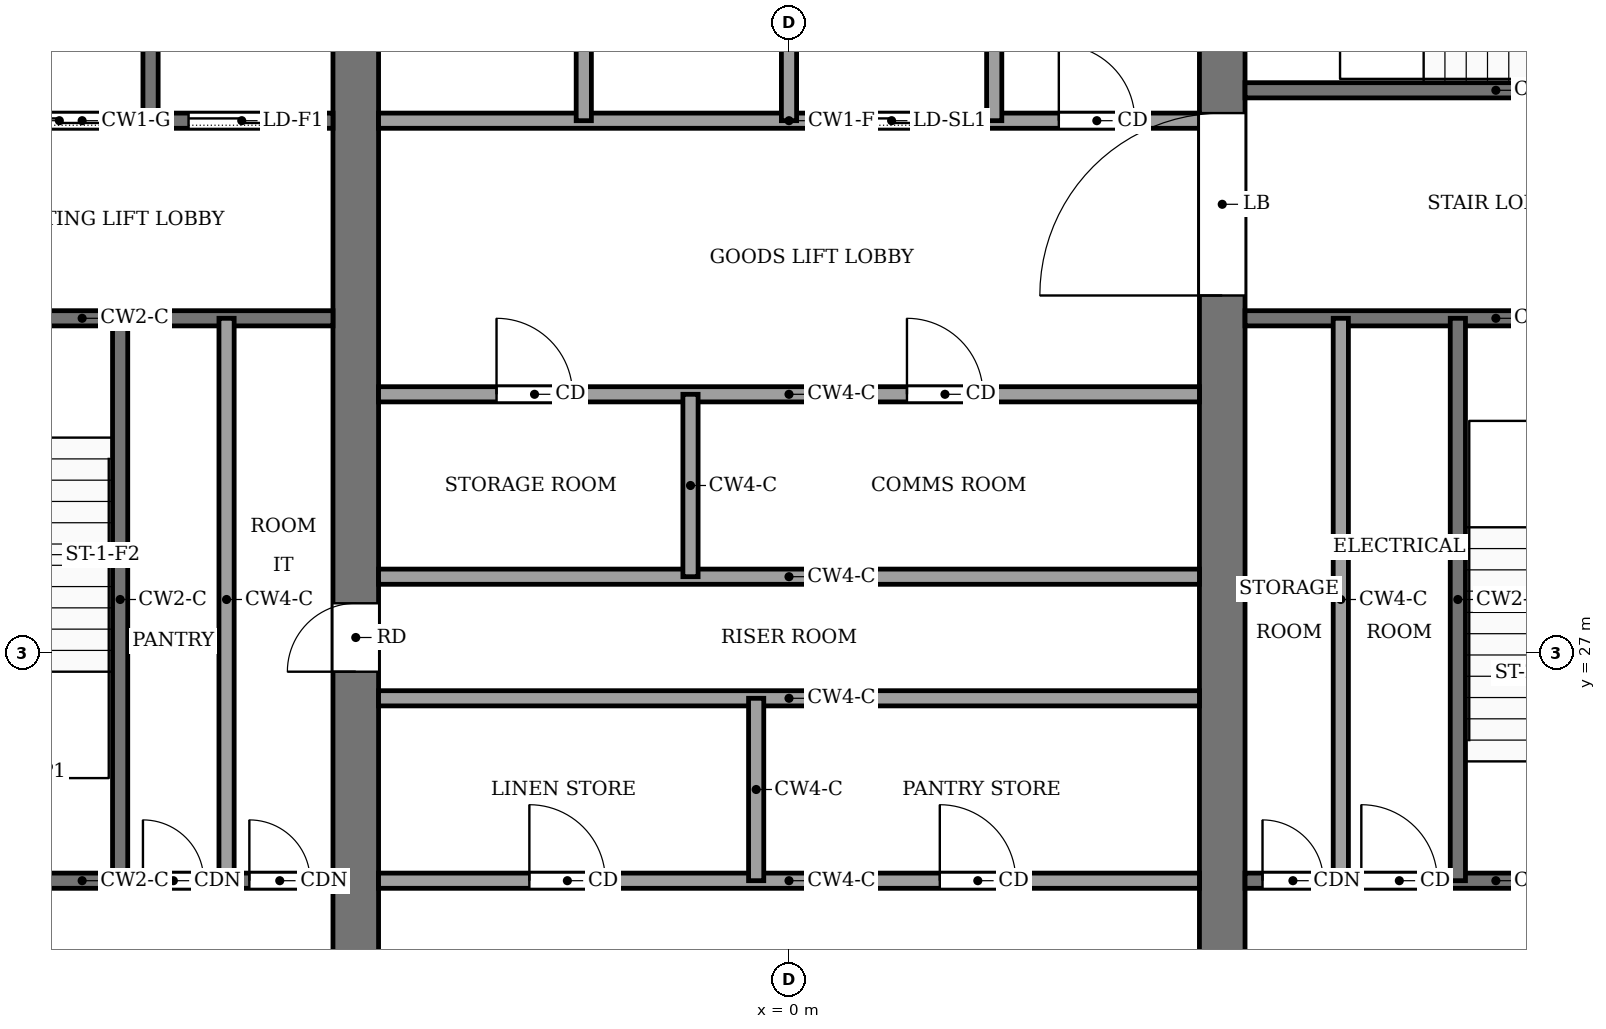
"""IFC4 building model, lengths in metres.
Left out: names, types, materials, properties, quantities, classifications, styles, units other than length and angle.
Written with IfcOpenShell. Run it as: python <this file> out.ifc"""

import sys

from ifc_helpers import new_model, si_unit, direction, frame, frame_2d, origin, place, context, subcontext, project, spatial, rectangle, extrude, element, fill, save


model = new_model("IFC4")
c1 = context("Model", 3, precision=1e-05, world=origin(), true_north=direction((0.0, 1.0)))
c2 = subcontext(c1, "Body", "Model", "MODEL_VIEW")
j1 = project(units=[si_unit("LENGTHUNIT", "METRE"), si_unit("PLANEANGLEUNIT", "RADIAN")], contexts=[c1])
p1 = place(None, origin())
s1 = spatial("IfcSite", under=j1, at=p1, CompositionType="ELEMENT")
p2 = place(p1, origin())
s2 = spatial("IfcBuilding", under=s1, at=p2, CompositionType="ELEMENT")
p3 = place(p2, frame((0.0, 0.0, 322.0)))
s3 = spatial("IfcBuildingStorey", under=s2, at=p3, CompositionType="ELEMENT", Elevation=322.0)
p4 = place(p3, frame((-5.7, 18.4, -0.13), z_axis=(0.0, 0.0, 1.0), x_axis=(0.0, 1.0, 0.0)))
e1 = element("IfcWall", 1, at=p4, inside=s3, PredefinedType="SHEAR", context=c2, shape_type="SweptSolid", body=[
    extrude(rectangle(XDim=19.2, YDim=0.6, at=frame_2d((9.6, 0.0))), origin(), (0.0, 0.0, 1.0), 4.0),
])
p5 = place(p4, frame((8.35, 0.0, 0.13)))
e2 = element("IfcOpeningElement", 2, at=p5, cuts=e1, PredefinedType="OPENING", context=c2, shape_type="SweptSolid", body=[
    extrude(rectangle(XDim=0.9, YDim=2.1, at=frame_2d((0.45, 1.05))), frame((0.0, 0.31, 0.0), z_axis=(0.0, -1.0, 0.0), x_axis=(1.0, 0.0, 0.0)), (0.0, 0.0, 1.0), 0.62),
])
p6 = place(p3, frame((5.7, 18.4, -0.13), z_axis=(0.0, 0.0, 1.0), x_axis=(0.0, 1.0, 0.0)))
e3 = element("IfcWall", 3, at=p6, inside=s3, PredefinedType="SHEAR", context=c2, shape_type="SweptSolid", body=[
    extrude(rectangle(XDim=19.2, YDim=0.6, at=frame_2d((9.6, 0.0))), origin(), (0.0, 0.0, 1.0), 4.0),
])
p7 = place(p6, frame((13.3, 0.0, 0.13)))
e4 = element("IfcOpeningElement", 4, at=p7, cuts=e3, PredefinedType="OPENING", context=c2, shape_type="SweptSolid", body=[
    extrude(rectangle(XDim=2.4, YDim=2.4, at=frame_2d((1.2, 1.2))), frame((0.0, 0.31, 0.0), z_axis=(0.0, -1.0, 0.0), x_axis=(1.0, 0.0, 0.0)), (0.0, 0.0, 1.0), 0.62),
])
p8 = place(p3, frame((-12.6, 24.0, 0.0), z_axis=(0.0, 0.0, 1.0), x_axis=(1.0, 0.0, 0.0)))
e5 = element("IfcWall", 5, at=p8, inside=s3, PredefinedType="PARTITIONING", context=c2, shape_type="SweptSolid", body=[
    extrude(rectangle(XDim=6.6, YDim=0.2, at=frame_2d((3.3, 0.0))), origin(), (0.0, 0.0, 1.0), 3.87),
])
p9 = place(p8, frame((4.1, 0.0, 0.0)))
e6 = element("IfcOpeningElement", 6, at=p9, cuts=e5, PredefinedType="OPENING", context=c2, shape_type="SweptSolid", body=[
    extrude(rectangle(XDim=0.8, YDim=2.1, at=frame_2d((0.4, 1.05))), frame((0.0, 0.11, 0.0), z_axis=(0.0, -1.0, 0.0), x_axis=(1.0, 0.0, 0.0)), (0.0, 0.0, 1.0), 0.22),
])
p10 = place(p8, frame((5.5, 0.0, 0.0)))
e7 = element("IfcOpeningElement", 7, at=p10, cuts=e5, PredefinedType="OPENING", context=c2, shape_type="SweptSolid", body=[
    extrude(rectangle(XDim=0.8, YDim=2.1, at=frame_2d((0.4, 1.05))), frame((0.0, 0.11, 0.0), z_axis=(0.0, -1.0, 0.0), x_axis=(1.0, 0.0, 0.0)), (0.0, 0.0, 1.0), 0.22),
])
p11 = place(p3, frame((-5.4, 24.0, 0.0), z_axis=(0.0, 0.0, 1.0), x_axis=(1.0, 0.0, 0.0)))
e8 = element("IfcWall", 8, at=p11, inside=s3, PredefinedType="PARTITIONING", context=c2, shape_type="SweptSolid", body=[
    extrude(rectangle(XDim=10.8, YDim=0.2, at=frame_2d((5.4, 0.0))), origin(), (0.0, 0.0, 1.0), 3.87),
])
p12 = place(p11, frame((1.984, 0.0, 0.0)))
e9 = element("IfcOpeningElement", 9, at=p12, cuts=e8, PredefinedType="OPENING", context=c2, shape_type="SweptSolid", body=[
    extrude(rectangle(XDim=1.0, YDim=2.1, at=frame_2d((0.5, 1.05))), frame((0.0, 0.11, 0.0), z_axis=(0.0, -1.0, 0.0), x_axis=(1.0, 0.0, 0.0)), (0.0, 0.0, 1.0), 0.22),
])
p13 = place(p11, frame((7.384, 0.0, 0.0)))
e10 = element("IfcOpeningElement", 10, at=p13, cuts=e8, PredefinedType="OPENING", context=c2, shape_type="SweptSolid", body=[
    extrude(rectangle(XDim=1.0, YDim=2.1, at=frame_2d((0.5, 1.05))), frame((0.0, 0.11, 0.0), z_axis=(0.0, -1.0, 0.0), x_axis=(1.0, 0.0, 0.0)), (0.0, 0.0, 1.0), 0.22),
])
p14 = place(p3, frame((6.0, 24.0, 0.0), z_axis=(0.0, 0.0, 1.0), x_axis=(1.0, 0.0, 0.0)))
e11 = element("IfcWall", 11, at=p14, inside=s3, PredefinedType="PARTITIONING", context=c2, shape_type="SweptSolid", body=[
    extrude(rectangle(XDim=6.6, YDim=0.2, at=frame_2d((3.3, 0.0))), origin(), (0.0, 0.0, 1.0), 3.87),
])
p15 = place(p14, frame((0.23, 0.0, 0.0)))
e12 = element("IfcOpeningElement", 12, at=p15, cuts=e11, PredefinedType="OPENING", context=c2, shape_type="SweptSolid", body=[
    extrude(rectangle(XDim=0.8, YDim=2.1, at=frame_2d((0.4, 1.05))), frame((0.0, 0.11, 0.0), z_axis=(0.0, -1.0, 0.0), x_axis=(1.0, 0.0, 0.0)), (0.0, 0.0, 1.0), 0.22),
])
p16 = place(p14, frame((1.53, 0.0, 0.0)))
e13 = element("IfcOpeningElement", 13, at=p16, cuts=e11, PredefinedType="OPENING", context=c2, shape_type="SweptSolid", body=[
    extrude(rectangle(XDim=1.0, YDim=2.1, at=frame_2d((0.5, 1.05))), frame((0.0, 0.11, 0.0), z_axis=(0.0, -1.0, 0.0), x_axis=(1.0, 0.0, 0.0)), (0.0, 0.0, 1.0), 0.22),
])
p17 = place(p14, frame((4.4, 0.0, 0.0)))
e14 = element("IfcOpeningElement", 14, at=p17, cuts=e11, PredefinedType="OPENING", context=c2, shape_type="SweptSolid", body=[
    extrude(rectangle(XDim=1.2, YDim=2.2, at=frame_2d((0.6, 1.1))), frame((0.0, 0.11, 0.0), z_axis=(0.0, -1.0, 0.0), x_axis=(1.0, 0.0, 0.0)), (0.0, 0.0, 1.0), 0.22),
])
for number, where, z_axis, x_axis in (
    (15, (-5.4, 26.4, 0.0), (0.0, 0.0, 1.0), (1.0, 0.0, 0.0)),
    (16, (-5.4, 28.0, 0.0), (0.0, 0.0, 1.0), (1.0, 0.0, 0.0)),
):
    element("IfcWall", number, at=place(p3, frame(where, z_axis=z_axis, x_axis=x_axis)), inside=s3, PredefinedType="PARTITIONING", context=c2, shape_type="SweptSolid", body=[
        extrude(rectangle(XDim=10.8, YDim=0.2, at=frame_2d((5.4, 0.0))), origin(), (0.0, 0.0, 1.0), 3.87),
    ])
p18 = place(p3, frame((-5.4, 30.4, 0.0), z_axis=(0.0, 0.0, 1.0), x_axis=(1.0, 0.0, 0.0)))
e17 = element("IfcWall", 17, at=p18, inside=s3, PredefinedType="PARTITIONING", context=c2, shape_type="SweptSolid", body=[
    extrude(rectangle(XDim=10.8, YDim=0.2, at=frame_2d((5.4, 0.0))), origin(), (0.0, 0.0, 1.0), 3.87),
])
p19 = place(p18, frame((1.552, 0.0, 0.0)))
e18 = element("IfcOpeningElement", 18, at=p19, cuts=e17, PredefinedType="OPENING", context=c2, shape_type="SweptSolid", body=[
    extrude(rectangle(XDim=1.0, YDim=2.1, at=frame_2d((0.5, 1.05))), frame((0.0, 0.11, 0.0), z_axis=(0.0, -1.0, 0.0), x_axis=(1.0, 0.0, 0.0)), (0.0, 0.0, 1.0), 0.22),
])
p20 = place(p18, frame((6.952, 0.0, 0.0)))
e19 = element("IfcOpeningElement", 19, at=p20, cuts=e17, PredefinedType="OPENING", context=c2, shape_type="SweptSolid", body=[
    extrude(rectangle(XDim=1.0, YDim=2.1, at=frame_2d((0.5, 1.05))), frame((0.0, 0.11, 0.0), z_axis=(0.0, -1.0, 0.0), x_axis=(1.0, 0.0, 0.0)), (0.0, 0.0, 1.0), 0.22),
])
p21 = place(p3, frame((-12.6, 31.4, 0.0), z_axis=(0.0, 0.0, 1.0), x_axis=(1.0, 0.0, 0.0)))
e20 = element("IfcWall", 20, at=p21, inside=s3, PredefinedType="PARTITIONING", context=c2, shape_type="SweptSolid", body=[
    extrude(rectangle(XDim=6.6, YDim=0.2, at=frame_2d((3.3, 0.0))), origin(), (0.0, 0.0, 1.0), 3.87),
])
p22 = place(p21, frame((1.0, 0.0, 0.0)))
e21 = element("IfcOpeningElement", 21, at=p22, cuts=e20, PredefinedType="OPENING", context=c2, shape_type="SweptSolid", body=[
    extrude(rectangle(XDim=1.2, YDim=2.2, at=frame_2d((0.6, 1.1))), frame((0.0, 0.11, 0.0), z_axis=(0.0, -1.0, 0.0), x_axis=(1.0, 0.0, 0.0)), (0.0, 0.0, 1.0), 0.22),
])
p23 = place(p3, frame((6.0, 31.4, 0.0), z_axis=(0.0, 0.0, 1.0), x_axis=(1.0, 0.0, 0.0)))
e22 = element("IfcWall", 22, at=p23, inside=s3, PredefinedType="PARTITIONING", context=c2, shape_type="SweptSolid", body=[
    extrude(rectangle(XDim=6.6, YDim=0.2, at=frame_2d((3.3, 0.0))), origin(), (0.0, 0.0, 1.0), 3.87),
])
p24 = place(p3, frame((-12.6, 34.0, 0.0), z_axis=(0.0, 0.0, 1.0), x_axis=(1.0, 0.0, 0.0)))
e23 = element("IfcWall", 23, at=p24, inside=s3, PredefinedType="PARTITIONING", context=c2, shape_type="SweptSolid", body=[
    extrude(rectangle(XDim=6.6, YDim=0.2, at=frame_2d((3.3, 0.0))), origin(), (0.0, 0.0, 1.0), 3.87),
])
p25 = place(p24, frame((4.7, 0.0, 0.0)))
e24 = element("IfcOpeningElement", 24, at=p25, cuts=e23, PredefinedType="OPENING", context=c2, shape_type="SweptSolid", body=[
    extrude(rectangle(XDim=1.4, YDim=2.2, at=frame_2d((0.7, 1.1))), frame((0.0, 0.11, 0.0), z_axis=(0.0, -1.0, 0.0), x_axis=(1.0, 0.0, 0.0)), (0.0, 0.0, 1.0), 0.22),
])
p26 = place(p24, frame((2.3, 0.0, 0.0)))
e25 = element("IfcOpeningElement", 25, at=p26, cuts=e23, PredefinedType="OPENING", context=c2, shape_type="SweptSolid", body=[
    extrude(rectangle(XDim=1.4, YDim=2.2, at=frame_2d((0.7, 1.1))), frame((0.0, 0.11, 0.0), z_axis=(0.0, -1.0, 0.0), x_axis=(1.0, 0.0, 0.0)), (0.0, 0.0, 1.0), 0.22),
])
p27 = place(p24, frame((0.45, 0.0, 0.0)))
e26 = element("IfcOpeningElement", 26, at=p27, cuts=e23, PredefinedType="OPENING", context=c2, shape_type="SweptSolid", body=[
    extrude(rectangle(XDim=0.9, YDim=2.1, at=frame_2d((0.45, 1.05))), frame((0.0, 0.11, 0.0), z_axis=(0.0, -1.0, 0.0), x_axis=(1.0, 0.0, 0.0)), (0.0, 0.0, 1.0), 0.22),
])
p28 = place(p3, frame((-5.4, 34.0, 0.0), z_axis=(0.0, 0.0, 1.0), x_axis=(1.0, 0.0, 0.0)))
e27 = element("IfcWall", 27, at=p28, inside=s3, PredefinedType="PARTITIONING", context=c2, shape_type="SweptSolid", body=[
    extrude(rectangle(XDim=10.8, YDim=0.2, at=frame_2d((5.4, 0.0))), origin(), (0.0, 0.0, 1.0), 3.87),
])
p29 = place(p28, frame((6.15, 0.0, 0.0)))
e28 = element("IfcOpeningElement", 28, at=p29, cuts=e27, PredefinedType="OPENING", context=c2, shape_type="SweptSolid", body=[
    extrude(rectangle(XDim=1.2, YDim=2.2, at=frame_2d((0.6, 1.1))), frame((0.0, 0.11, 0.0), z_axis=(0.0, -1.0, 0.0), x_axis=(1.0, 0.0, 0.0)), (0.0, 0.0, 1.0), 0.22),
])
p30 = place(p28, frame((8.95, 0.0, 0.0)))
e29 = element("IfcOpeningElement", 29, at=p30, cuts=e27, PredefinedType="OPENING", context=c2, shape_type="SweptSolid", body=[
    extrude(rectangle(XDim=1.0, YDim=2.1, at=frame_2d((0.5, 1.05))), frame((0.0, 0.11, 0.0), z_axis=(0.0, -1.0, 0.0), x_axis=(1.0, 0.0, 0.0)), (0.0, 0.0, 1.0), 0.22),
])
p31 = place(p3, frame((6.0, 34.4, 0.0), z_axis=(0.0, 0.0, 1.0), x_axis=(1.0, 0.0, 0.0)))
e30 = element("IfcWall", 30, at=p31, inside=s3, PredefinedType="PARTITIONING", context=c2, shape_type="SweptSolid", body=[
    extrude(rectangle(XDim=6.6, YDim=0.2, at=frame_2d((3.3, 0.0))), origin(), (0.0, 0.0, 1.0), 3.87),
])
p32 = place(p31, frame((4.8, 0.0, 0.0)))
e31 = element("IfcOpeningElement", 31, at=p32, cuts=e30, PredefinedType="OPENING", context=c2, shape_type="SweptSolid", body=[
    extrude(rectangle(XDim=1.2, YDim=2.2, at=frame_2d((0.6, 1.1))), frame((0.0, 0.11, 0.0), z_axis=(0.0, -1.0, 0.0), x_axis=(1.0, 0.0, 0.0)), (0.0, 0.0, 1.0), 0.22),
])
p33 = place(p3, frame((-8.8, 24.0, 0.0), z_axis=(0.0, 0.0, 1.0), x_axis=(0.0, 1.0, 0.0)))
e32 = element("IfcWall", 32, at=p33, inside=s3, PredefinedType="PARTITIONING", context=c2, shape_type="SweptSolid", body=[
    extrude(rectangle(XDim=7.4, YDim=0.2, at=frame_2d((3.7, 0.0))), origin(), (0.0, 0.0, 1.0), 3.87),
])
p34 = place(p3, frame((-8.4, 34.0, 0.0), z_axis=(0.0, 0.0, 1.0), x_axis=(0.0, 1.0, 0.0)))
e33 = element("IfcWall", 33, at=p34, inside=s3, PredefinedType="PARTITIONING", context=c2, shape_type="SweptSolid", body=[
    extrude(rectangle(XDim=3.6, YDim=0.2, at=frame_2d((1.8, 0.0))), origin(), (0.0, 0.0, 1.0), 3.87),
])
p35 = place(p3, frame((-7.4, 24.0, 0.0), z_axis=(0.0, 0.0, 1.0), x_axis=(0.0, 1.0, 0.0)))
e34 = element("IfcWall", 34, at=p35, inside=s3, PredefinedType="PARTITIONING", context=c2, shape_type="SweptSolid", body=[
    extrude(rectangle(XDim=7.4, YDim=0.2, at=frame_2d((3.7, 0.0))), origin(), (0.0, 0.0, 1.0), 3.87),
])
p36 = place(p3, frame((-2.7, 34.0, 0.0), z_axis=(0.0, 0.0, 1.0), x_axis=(0.0, 1.0, 0.0)))
e35 = element("IfcWall", 35, at=p36, inside=s3, PredefinedType="PARTITIONING", context=c2, shape_type="SweptSolid", body=[
    extrude(rectangle(XDim=3.6, YDim=0.2, at=frame_2d((1.8, 0.0))), origin(), (0.0, 0.0, 1.0), 3.87),
])
for number, where, z_axis, x_axis in (
    (36, (-1.296, 28.0, 0.0), (0.0, 0.0, 1.0), (0.0, 1.0, 0.0)),
    (37, (-0.432, 24.0, 0.0), (0.0, 0.0, 1.0), (0.0, 1.0, 0.0)),
):
    element("IfcWall", number, at=place(p3, frame(where, z_axis=z_axis, x_axis=x_axis)), inside=s3, PredefinedType="PARTITIONING", context=c2, shape_type="SweptSolid", body=[
        extrude(rectangle(XDim=2.4, YDim=0.2, at=frame_2d((1.2, 0.0))), origin(), (0.0, 0.0, 1.0), 3.87),
    ])
for number, where, z_axis, x_axis in (
    (38, (0.0, 34.0, 0.0), (0.0, 0.0, 1.0), (0.0, 1.0, 0.0)),
    (39, (2.7, 34.0, 0.0), (0.0, 0.0, 1.0), (0.0, 1.0, 0.0)),
):
    element("IfcWall", number, at=place(p3, frame(where, z_axis=z_axis, x_axis=x_axis)), inside=s3, PredefinedType="PARTITIONING", context=c2, shape_type="SweptSolid", body=[
        extrude(rectangle(XDim=3.6, YDim=0.2, at=frame_2d((1.8, 0.0))), origin(), (0.0, 0.0, 1.0), 3.87),
    ])
for number, where, z_axis, x_axis in (
    (40, (7.26, 24.0, 0.0), (0.0, 0.0, 1.0), (0.0, 1.0, 0.0)),
    (41, (8.8, 24.0, 0.0), (0.0, 0.0, 1.0), (0.0, 1.0, 0.0)),
):
    element("IfcWall", number, at=place(p3, frame(where, z_axis=z_axis, x_axis=x_axis)), inside=s3, PredefinedType="PARTITIONING", context=c2, shape_type="SweptSolid", body=[
        extrude(rectangle(XDim=7.4, YDim=0.2, at=frame_2d((3.7, 0.0))), origin(), (0.0, 0.0, 1.0), 3.87),
    ])
p37 = place(p29, origin())
e42 = element("IfcDoor", 42, at=p37, inside=s3, OperationType="SLIDING_TO_LEFT", PredefinedType="DOOR", context=c2, shape_type="SweptSolid", body=[
    extrude(rectangle(XDim=1.2, YDim=2.2, at=frame_2d((0.6, 1.1))), frame((0.0, 0.025, 0.0), z_axis=(0.0, -1.0, 0.0), x_axis=(1.0, 0.0, 0.0)), (0.0, 0.0, 1.0), 0.05),
])
fill(e28, e42)
p38 = place(p25, origin())
e43 = element("IfcDoor", 43, at=p38, inside=s3, OperationType="SLIDING_TO_LEFT", PredefinedType="DOOR", context=c2, shape_type="SweptSolid", body=[
    extrude(rectangle(XDim=1.4, YDim=2.2, at=frame_2d((0.7, 1.1))), frame((0.0, 0.025, 0.0), z_axis=(0.0, -1.0, 0.0), x_axis=(1.0, 0.0, 0.0)), (0.0, 0.0, 1.0), 0.05),
])
fill(e24, e43)
p39 = place(p26, origin())
e44 = element("IfcDoor", 44, at=p39, inside=s3, OperationType="SLIDING_TO_LEFT", PredefinedType="DOOR", context=c2, shape_type="SweptSolid", body=[
    extrude(rectangle(XDim=1.4, YDim=2.2, at=frame_2d((0.7, 1.1))), frame((0.0, 0.025, 0.0), z_axis=(0.0, -1.0, 0.0), x_axis=(1.0, 0.0, 0.0)), (0.0, 0.0, 1.0), 0.05),
])
fill(e25, e44)
p40 = place(p12, origin())
e45 = element("IfcDoor", 45, at=p40, inside=s3, OperationType="SINGLE_SWING_LEFT", PredefinedType="DOOR", context=c2, shape_type="SweptSolid", body=[
    extrude(rectangle(XDim=1.0, YDim=2.1, at=frame_2d((0.5, 1.05))), frame((0.0, 0.025, 0.0), z_axis=(0.0, -1.0, 0.0), x_axis=(1.0, 0.0, 0.0)), (0.0, 0.0, 1.0), 0.05),
])
fill(e9, e45)
p41 = place(p13, origin())
e46 = element("IfcDoor", 46, at=p41, inside=s3, OperationType="SINGLE_SWING_RIGHT", PredefinedType="DOOR", context=c2, shape_type="SweptSolid", body=[
    extrude(rectangle(XDim=1.0, YDim=2.1, at=frame_2d((0.5, 1.05))), frame((0.0, 0.025, 0.0), z_axis=(0.0, -1.0, 0.0), x_axis=(1.0, 0.0, 0.0)), (0.0, 0.0, 1.0), 0.05),
])
fill(e10, e46)
p42 = place(p19, origin())
e47 = element("IfcDoor", 47, at=p42, inside=s3, OperationType="SINGLE_SWING_LEFT", PredefinedType="DOOR", context=c2, shape_type="SweptSolid", body=[
    extrude(rectangle(XDim=1.0, YDim=2.1, at=frame_2d((0.5, 1.05))), frame((0.0, 0.025, 0.0), z_axis=(0.0, -1.0, 0.0), x_axis=(1.0, 0.0, 0.0)), (0.0, 0.0, 1.0), 0.05),
])
fill(e18, e47)
p43 = place(p20, origin())
e48 = element("IfcDoor", 48, at=p43, inside=s3, OperationType="SINGLE_SWING_RIGHT", PredefinedType="DOOR", context=c2, shape_type="SweptSolid", body=[
    extrude(rectangle(XDim=1.0, YDim=2.1, at=frame_2d((0.5, 1.05))), frame((0.0, 0.025, 0.0), z_axis=(0.0, -1.0, 0.0), x_axis=(1.0, 0.0, 0.0)), (0.0, 0.0, 1.0), 0.05),
])
fill(e19, e48)
p44 = place(p9, origin())
e49 = element("IfcDoor", 49, at=p44, inside=s3, OperationType="SINGLE_SWING_LEFT", PredefinedType="DOOR", context=c2, shape_type="SweptSolid", body=[
    extrude(rectangle(XDim=0.8, YDim=2.1, at=frame_2d((0.4, 1.05))), frame((0.0, 0.025, 0.0), z_axis=(0.0, -1.0, 0.0), x_axis=(1.0, 0.0, 0.0)), (0.0, 0.0, 1.0), 0.05),
])
fill(e6, e49)
p45 = place(p10, origin())
e50 = element("IfcDoor", 50, at=p45, inside=s3, OperationType="SINGLE_SWING_RIGHT", PredefinedType="DOOR", context=c2, shape_type="SweptSolid", body=[
    extrude(rectangle(XDim=0.8, YDim=2.1, at=frame_2d((0.4, 1.05))), frame((0.0, 0.025, 0.0), z_axis=(0.0, -1.0, 0.0), x_axis=(1.0, 0.0, 0.0)), (0.0, 0.0, 1.0), 0.05),
])
fill(e7, e50)
p46 = place(p15, origin())
e51 = element("IfcDoor", 51, at=p46, inside=s3, OperationType="SINGLE_SWING_RIGHT", PredefinedType="DOOR", context=c2, shape_type="SweptSolid", body=[
    extrude(rectangle(XDim=0.8, YDim=2.1, at=frame_2d((0.4, 1.05))), frame((0.0, 0.025, 0.0), z_axis=(0.0, -1.0, 0.0), x_axis=(1.0, 0.0, 0.0)), (0.0, 0.0, 1.0), 0.05),
])
fill(e12, e51)
p47 = place(p16, origin())
e52 = element("IfcDoor", 52, at=p47, inside=s3, OperationType="SINGLE_SWING_LEFT", PredefinedType="DOOR", context=c2, shape_type="SweptSolid", body=[
    extrude(rectangle(XDim=1.0, YDim=2.1, at=frame_2d((0.5, 1.05))), frame((0.0, 0.025, 0.0), z_axis=(0.0, -1.0, 0.0), x_axis=(1.0, 0.0, 0.0)), (0.0, 0.0, 1.0), 0.05),
])
fill(e13, e52)
p48 = place(p30, origin())
e53 = element("IfcDoor", 53, at=p48, inside=s3, OperationType="SINGLE_SWING_LEFT", PredefinedType="DOOR", context=c2, shape_type="SweptSolid", body=[
    extrude(rectangle(XDim=1.0, YDim=2.1, at=frame_2d((0.5, 1.05))), frame((0.0, 0.025, 0.0), z_axis=(0.0, -1.0, 0.0), x_axis=(1.0, 0.0, 0.0)), (0.0, 0.0, 1.0), 0.05),
])
fill(e29, e53)
p49 = place(p5, origin())
e54 = element("IfcDoor", 54, at=p49, inside=s3, OperationType="SINGLE_SWING_RIGHT", PredefinedType="DOOR", context=c2, shape_type="SweptSolid", body=[
    extrude(rectangle(XDim=0.9, YDim=2.1, at=frame_2d((0.45, 1.05))), frame((0.0, 0.025, 0.0), z_axis=(0.0, -1.0, 0.0), x_axis=(1.0, 0.0, 0.0)), (0.0, 0.0, 1.0), 0.05),
])
fill(e2, e54)
p50 = place(p7, origin())
e55 = element("IfcDoor", 55, at=p50, inside=s3, OperationType="DOUBLE_DOOR_SINGLE_SWING", PredefinedType="DOOR", context=c2, shape_type="SweptSolid", body=[
    extrude(rectangle(XDim=2.4, YDim=2.4, at=frame_2d((1.2, 1.2))), frame((0.0, 0.025, 0.0), z_axis=(0.0, -1.0, 0.0), x_axis=(1.0, 0.0, 0.0)), (0.0, 0.0, 1.0), 0.05),
])
fill(e4, e55)
save(model, sys.argv[1])
